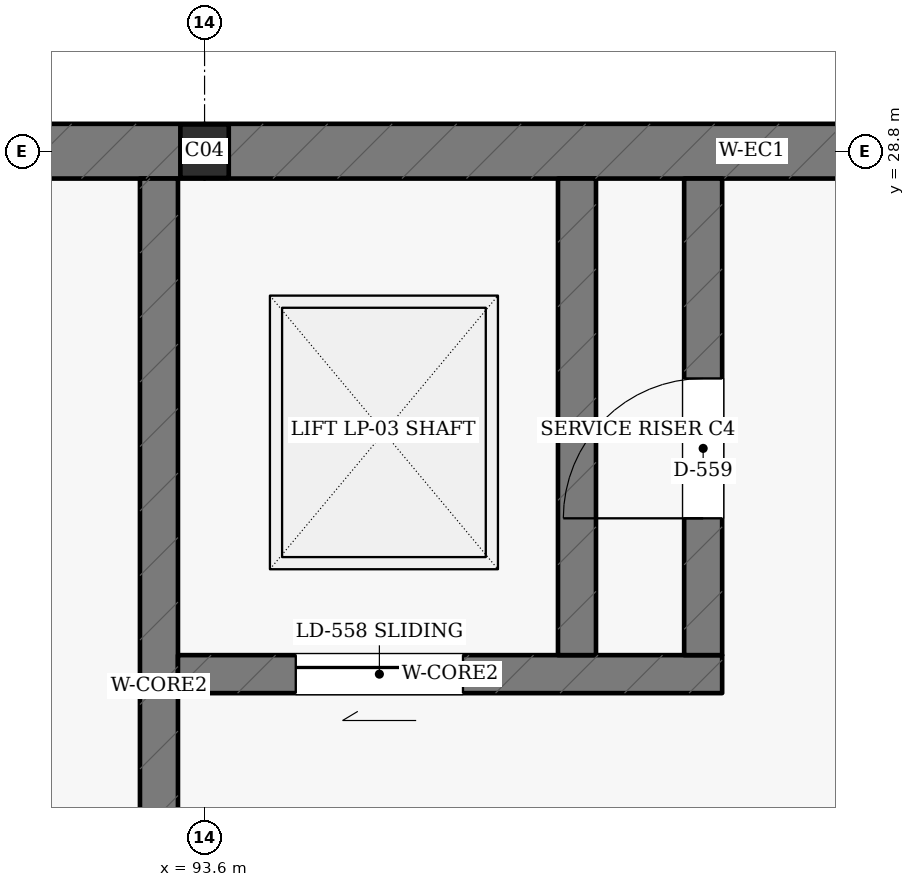
"""IFC4 building model, lengths in metres.
Left out: names, types, materials, properties, quantities, classifications, styles, units other than length and angle.
Written with IfcOpenShell. Run it as: python <this file> out.ifc"""

import sys

from ifc_helpers import new_model, si_unit, direction, frame, frame_2d, origin, origin_2d, place, context, subcontext, project, spatial, rectangle, i_section, extrude, element, fill, save


model = new_model("IFC4")
c1 = context("Model", 3, precision=1e-05, world=origin(), true_north=direction((0.0, 1.0)))
c2 = subcontext(c1, "Body", "Model", "MODEL_VIEW")
j1 = project(units=[si_unit("LENGTHUNIT", "METRE"), si_unit("PLANEANGLEUNIT", "RADIAN")], contexts=[c1])
p1 = place(None, origin())
s1 = spatial("IfcSite", under=j1, at=p1, CompositionType="ELEMENT")
p2 = place(p1, origin())
s2 = spatial("IfcBuilding", under=s1, at=p2, CompositionType="ELEMENT")
p3 = place(p2, origin())
s3 = spatial("IfcBuildingStorey", under=s2, at=p3, CompositionType="ELEMENT", Elevation=0.0)
p4 = place(p3, frame((93.6, 28.8, -0.3), z_axis=(0.0, 0.0, 1.0), x_axis=(1.0, 0.0, 0.0)))
e1 = element("IfcColumn", 1, at=p4, inside=s3, PredefinedType="COLUMN", context=c2, shape_type="SweptSolid", body=[
    extrude(i_section(OverallWidth=0.318, OverallDepth=0.353, WebThickness=0.023, FlangeThickness=0.038, FilletRadius=0.015, at=origin_2d()), origin(), (0.0, 0.0, 1.0), 5.7),
])
p5 = place(p3, frame((86.4, 28.8, 0.0), z_axis=(0.0, 0.0, 1.0), x_axis=(1.0, 0.0, 0.0)))
e2 = element("IfcWall", 2, at=p5, inside=s3, PredefinedType="SHEAR", context=c2, shape_type="SweptSolid", body=[
    extrude(rectangle(XDim=7.2, YDim=0.36, at=frame_2d((3.6, 0.0))), origin(), (0.0, 0.0, 1.0), 4.505),
])
p6 = place(p5, frame((2.85, 0.0, 0.0)))
e3 = element("IfcOpeningElement", 3, at=p6, cuts=e2, PredefinedType="OPENING", context=c2, shape_type="SweptSolid", body=[
    extrude(rectangle(XDim=1.5, YDim=2.15, at=frame_2d((0.75, 1.075))), frame((0.0, 0.19, 0.0), z_axis=(0.0, -1.0, 0.0), x_axis=(1.0, 0.0, 0.0)), (0.0, 0.0, 1.0), 0.38),
])
p7 = place(p3, frame((93.6, 28.8, 0.0), z_axis=(0.0, 0.0, 1.0), x_axis=(1.0, 0.0, 0.0)))
e4 = element("IfcWall", 4, at=p7, inside=s3, PredefinedType="SHEAR", context=c2, shape_type="SweptSolid", body=[
    extrude(rectangle(XDim=7.2, YDim=0.36, at=frame_2d((3.6, 0.0))), origin(), (0.0, 0.0, 1.0), 4.355),
])
p8 = place(p3, frame((93.3, 21.95, 0.0), z_axis=(0.0, 0.0, 1.0), x_axis=(0.0, 1.0, 0.0)))
e5 = element("IfcWall", 5, at=p8, inside=s3, PredefinedType="SHEAR", context=c2, shape_type="SweptSolid", body=[
    extrude(rectangle(XDim=6.67, YDim=0.25, at=frame_2d((3.335, 0.0))), origin(), (0.0, 0.0, 1.0), 4.45),
])
p9 = place(p8, frame((0.95, 0.0, 0.0)))
e6 = element("IfcOpeningElement", 6, at=p9, cuts=e5, PredefinedType="OPENING", context=c2, shape_type="SweptSolid", body=[
    extrude(rectangle(XDim=1.35, YDim=2.15, at=frame_2d((0.675, 1.075))), frame((0.0, 0.135, 0.0), z_axis=(0.0, -1.0, 0.0), x_axis=(1.0, 0.0, 0.0)), (0.0, 0.0, 1.0), 0.27),
])
p10 = place(p3, frame((93.425, 25.36, 0.0), z_axis=(0.0, 0.0, 1.0), x_axis=(1.0, 0.0, 0.0)))
e7 = element("IfcWall", 7, at=p10, inside=s3, PredefinedType="SHEAR", context=c2, shape_type="SweptSolid", body=[
    extrude(rectangle(XDim=3.58, YDim=0.25, at=frame_2d((1.79, 0.0))), origin(), (0.0, 0.0, 1.0), 4.45),
])
p11 = place(p10, frame((0.775, 0.0, 0.0)))
e8 = element("IfcOpeningElement", 8, at=p11, cuts=e7, PredefinedType="OPENING", context=c2, shape_type="SweptSolid", body=[
    extrude(rectangle(XDim=1.1, YDim=2.15, at=frame_2d((0.55, 1.075))), frame((0.0, 0.135, 0.0), z_axis=(0.0, -1.0, 0.0), x_axis=(1.0, 0.0, 0.0)), (0.0, 0.0, 1.0), 0.27),
])
p12 = place(p3, frame((96.05, 25.485, 0.0), z_axis=(0.0, 0.0, 1.0), x_axis=(0.0, 1.0, 0.0)))
e9 = element("IfcWall", 9, at=p12, inside=s3, PredefinedType="SHEAR", context=c2, shape_type="SweptSolid", body=[
    extrude(rectangle(XDim=3.135, YDim=0.25, at=frame_2d((1.567, 0.0))), origin(), (0.0, 0.0, 1.0), 4.45),
])
p13 = place(p3, frame((96.88, 25.485, 0.0), z_axis=(0.0, 0.0, 1.0), x_axis=(0.0, 1.0, 0.0)))
e10 = element("IfcWall", 10, at=p13, inside=s3, PredefinedType="SHEAR", context=c2, shape_type="SweptSolid", body=[
    extrude(rectangle(XDim=3.135, YDim=0.25, at=frame_2d((1.567, 0.0))), origin(), (0.0, 0.0, 1.0), 4.45),
])
p14 = place(p13, frame((0.9, 0.0, 0.0)))
e11 = element("IfcOpeningElement", 11, at=p14, cuts=e10, PredefinedType="OPENING", context=c2, shape_type="SweptSolid", body=[
    extrude(rectangle(XDim=0.92, YDim=2.05, at=frame_2d((0.46, 1.025))), frame((0.0, 0.135, 0.0), z_axis=(0.0, -1.0, 0.0), x_axis=(1.0, 0.0, 0.0)), (0.0, 0.0, 1.0), 0.27),
])
p15 = place(p11, origin())
e12 = element("IfcDoor", 12, at=p15, inside=s3, OperationType="SLIDING_TO_LEFT", PredefinedType="DOOR", context=c2, shape_type="SweptSolid", body=[
    extrude(rectangle(XDim=1.1, YDim=2.15, at=frame_2d((0.55, 1.075))), frame((0.0, 0.025, 0.0), z_axis=(0.0, -1.0, 0.0), x_axis=(1.0, 0.0, 0.0)), (0.0, 0.0, 1.0), 0.05),
])
fill(e8, e12)
p16 = place(p14, origin())
e13 = element("IfcDoor", 13, at=p16, inside=s3, OperationType="SINGLE_SWING_LEFT", PredefinedType="DOOR", context=c2, shape_type="SweptSolid", body=[
    extrude(rectangle(XDim=0.92, YDim=2.05, at=frame_2d((0.46, 1.025))), frame((0.0, 0.025, 0.0), z_axis=(0.0, -1.0, 0.0), x_axis=(1.0, 0.0, 0.0)), (0.0, 0.0, 1.0), 0.05),
])
fill(e11, e13)
save(model, sys.argv[1])
